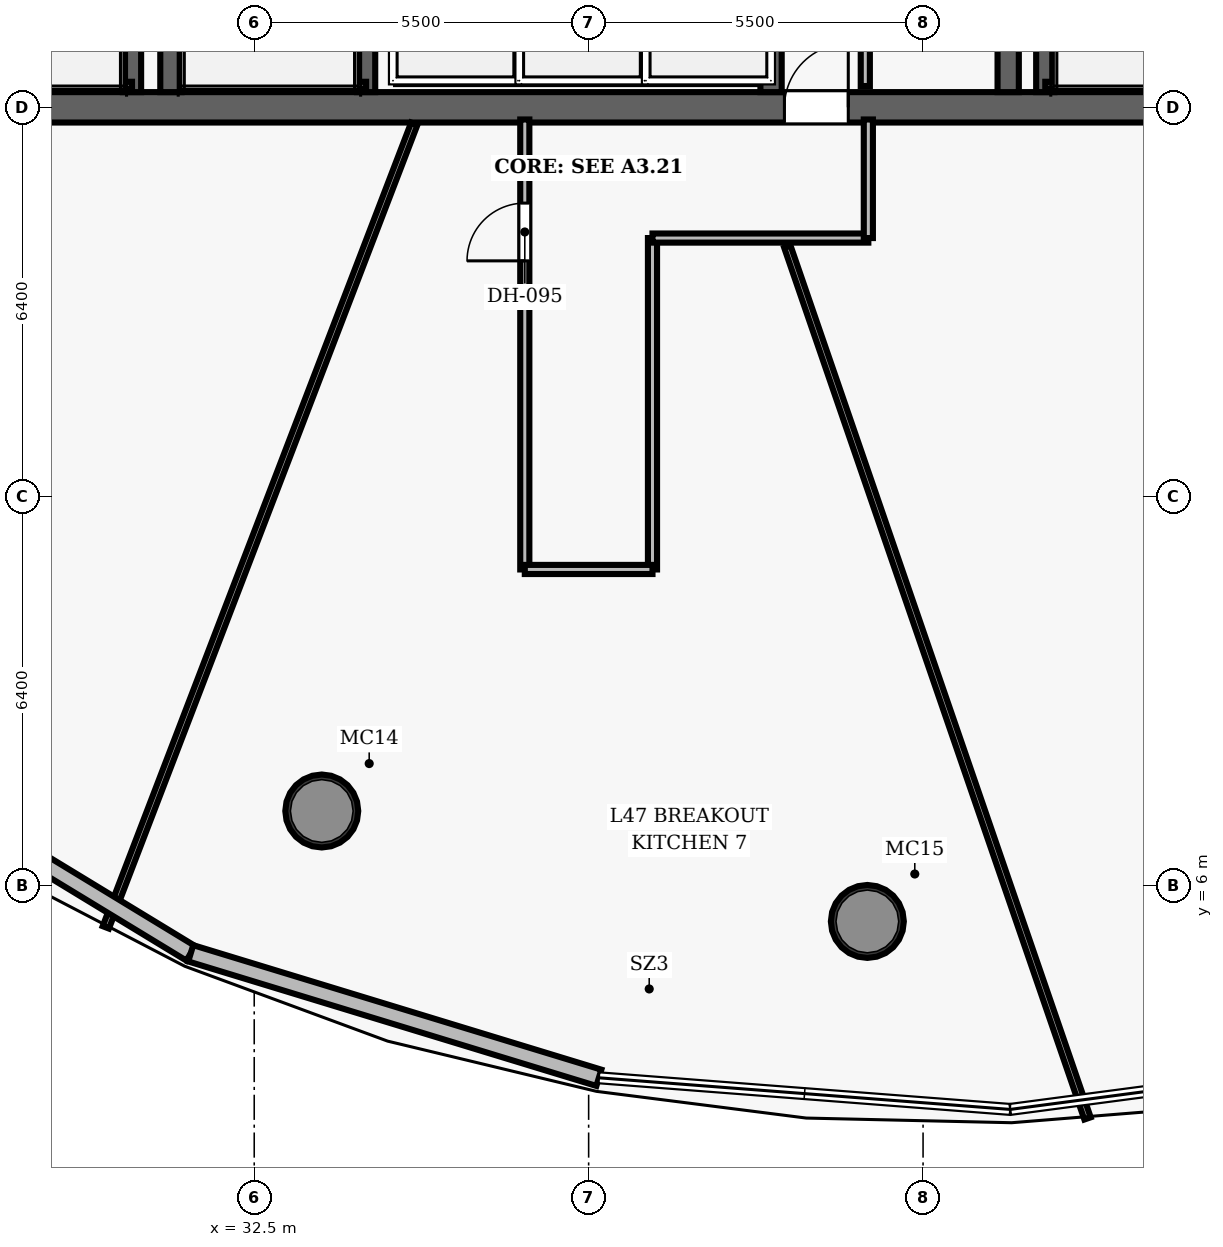
"""IFC4 building model, lengths in metres.
Left out: names, types, materials, properties, quantities, classifications, styles, units other than length and angle.
Written with IfcOpenShell. Run it as: python <this file> out.ifc"""

import sys

from ifc_helpers import new_model, si_unit, direction, frame, frame_2d, origin, origin_2d, place, context, subcontext, project, spatial, rectangle, hollow_circle, extrude, element, fill, save


model = new_model("IFC4")
c1 = context("Model", 3, precision=1e-05, world=origin(), true_north=direction((0.0, 1.0)))
c2 = subcontext(c1, "Body", "Model", "MODEL_VIEW")
j1 = project(units=[si_unit("LENGTHUNIT", "METRE"), si_unit("PLANEANGLEUNIT", "RADIAN")], contexts=[c1])
p1 = place(None, origin())
s1 = spatial("IfcSite", under=j1, at=p1, CompositionType="ELEMENT")
p2 = place(p1, origin())
s2 = spatial("IfcBuilding", under=s1, at=p2, CompositionType="ELEMENT")
p3 = place(p2, frame((0.0, 0.0, 186.6)))
s3 = spatial("IfcBuildingStorey", under=s2, at=p3, CompositionType="ELEMENT", Elevation=186.6)
p4 = place(p3, frame((26.75, 18.8, 0.0), z_axis=(0.0, 0.0, 1.0), x_axis=(1.0, 0.0, 0.0)))
e1 = element("IfcWall", 1, at=p4, inside=s3, PredefinedType="SHEAR", context=c2, shape_type="SweptSolid", body=[
    extrude(rectangle(XDim=22.5, YDim=0.5, at=frame_2d((11.25, 0.0))), origin(), (0.0, 0.0, 1.0), 3.85),
])
p5 = place(p4, frame((14.47, 0.0, 0.0)))
e2 = element("IfcOpeningElement", 2, at=p5, cuts=e1, PredefinedType="OPENING", context=c2, shape_type="SweptSolid", body=[
    extrude(rectangle(XDim=1.05, YDim=2.15, at=frame_2d((0.525, 1.075))), frame((0.0, 0.26, 0.0), z_axis=(0.0, -1.0, 0.0), x_axis=(1.0, 0.0, 0.0)), (0.0, 0.0, 1.0), 0.52),
])
for number, where, z_axis, x_axis in (
    (3, (31.13, 19.05, 0.0), (0.0, 0.0, 1.0), (0.0, 1.0, 0.0)),
    (4, (44.9, 19.05, 0.0), (0.0, 0.0, 1.0), (0.0, 1.0, 0.0)),
):
    element("IfcWall", number, at=place(p3, frame(where, z_axis=z_axis, x_axis=x_axis)), inside=s3, PredefinedType="SHEAR", context=c2, shape_type="SweptSolid", body=[
        extrude(rectangle(XDim=13.9, YDim=0.35, at=frame_2d((6.95, 0.0))), origin(), (0.0, 0.0, 1.0), 3.85),
    ])
for number, where, z_axis, x_axis in (
    (5, (33.611, 7.228, 0.0), (0.0, 0.0, 1.0), (1.0, 0.0, 0.0)),
    (6, (42.584, 5.412, 0.0), (0.0, 0.0, 1.0), (1.0, 0.0, 0.0)),
):
    element("IfcColumn", number, at=place(p3, frame(where, z_axis=z_axis, x_axis=x_axis)), inside=s3, PredefinedType="COLUMN", context=c2, shape_type="SweptSolid", body=[
        extrude(hollow_circle(Radius=0.6, WallThickness=0.05, at=origin_2d()), origin(), (0.0, 0.0, 1.0), 3.85),
    ])
p6 = place(p3, frame((30.49, 19.05, 0.0), z_axis=(0.0, 0.0, 1.0), x_axis=(0.0, 1.0, 0.0)))
e7 = element("IfcWall", 7, at=p6, inside=s3, PredefinedType="SHEAR", context=c2, shape_type="SweptSolid", body=[
    extrude(rectangle(XDim=7.5, YDim=0.3, at=frame_2d((3.75, 0.0))), origin(), (0.0, 0.0, 1.0), 3.85),
])
p7 = place(p3, frame((27.395, 19.16, 0.0), z_axis=(0.0, 0.0, 1.0), x_axis=(1.0, 0.0, 0.0)))
e8 = element("IfcWall", 8, at=p7, inside=s3, PredefinedType="SHEAR", context=c2, shape_type="SweptSolid", body=[
    extrude(rectangle(XDim=3.095, YDim=0.12, at=frame_2d((1.547, 0.0))), origin(), (0.0, 0.0, 1.0), 3.85),
])
p8 = place(p3, frame((45.51, 19.05, 0.0), z_axis=(0.0, 0.0, 1.0), x_axis=(0.0, 1.0, 0.0)))
e9 = element("IfcWall", 9, at=p8, inside=s3, PredefinedType="SHEAR", context=c2, shape_type="SweptSolid", body=[
    extrude(rectangle(XDim=7.5, YDim=0.3, at=frame_2d((3.75, 0.0))), origin(), (0.0, 0.0, 1.0), 3.85),
])
p9 = place(p3, frame((45.51, 19.16, 0.0), z_axis=(0.0, 0.0, 1.0), x_axis=(1.0, 0.0, 0.0)))
e10 = element("IfcWall", 10, at=p9, inside=s3, PredefinedType="SHEAR", context=c2, shape_type="SweptSolid", body=[
    extrude(rectangle(XDim=3.095, YDim=0.12, at=frame_2d((1.547, 0.0))), origin(), (0.0, 0.0, 1.0), 3.85),
])
p10 = place(p3, frame((34.34, 19.05, 0.0), z_axis=(0.0, 0.0, 1.0), x_axis=(0.0, 1.0, 0.0)))
e11 = element("IfcWall", 11, at=p10, inside=s3, PredefinedType="SHEAR", context=c2, shape_type="SweptSolid", body=[
    extrude(rectangle(XDim=7.5, YDim=0.3, at=frame_2d((3.75, 0.0))), origin(), (0.0, 0.0, 1.0), 3.85),
])
p11 = place(p3, frame((31.3, 19.16, 0.0), z_axis=(0.0, 0.0, 1.0), x_axis=(1.0, 0.0, 0.0)))
e12 = element("IfcWall", 12, at=p11, inside=s3, PredefinedType="SHEAR", context=c2, shape_type="SweptSolid", body=[
    extrude(rectangle(XDim=3.04, YDim=0.12, at=frame_2d((1.52, 0.0))), origin(), (0.0, 0.0, 1.0), 3.85),
])
p12 = place(p3, frame((41.0, 19.05, 0.0), z_axis=(0.0, 0.0, 1.0), x_axis=(0.0, 1.0, 0.0)))
e13 = element("IfcWall", 13, at=p12, inside=s3, PredefinedType="SHEAR", context=c2, shape_type="SweptSolid", body=[
    extrude(rectangle(XDim=2.08, YDim=0.35, at=frame_2d((1.04, 0.0))), origin(), (0.0, 0.0, 1.0), 3.035),
])
p13 = place(p3, frame((42.55, 19.15, 0.0), z_axis=(0.0, 0.0, 1.0), x_axis=(0.0, 1.0, 0.0)))
e14 = element("IfcWall", 14, at=p13, inside=s3, PredefinedType="PARTITIONING", context=c2, shape_type="SweptSolid", body=[
    extrude(rectangle(XDim=2.75, YDim=0.15, at=frame_2d((1.375, 0.0))), origin(), (0.0, 0.0, 1.0), 3.035),
])
p14 = place(p13, frame((0.7, 0.0, 0.0)))
e15 = element("IfcOpeningElement", 15, at=p14, cuts=e14, PredefinedType="OPENING", context=c2, shape_type="SweptSolid", body=[
    extrude(rectangle(XDim=0.85, YDim=2.1, at=frame_2d((0.425, 1.05))), frame((0.0, 0.085, 0.0), z_axis=(0.0, -1.0, 0.0), x_axis=(1.0, 0.0, 0.0)), (0.0, 0.0, 1.0), 0.17),
])
p15 = place(p3, frame((36.95, 11.2, 0.0), z_axis=(0.0, 0.0, 1.0), x_axis=(0.0, 1.0, 0.0)))
e16 = element("IfcWall", 16, at=p15, inside=s3, PredefinedType="PARTITIONING", context=c2, shape_type="SweptSolid", body=[
    extrude(rectangle(XDim=7.4, YDim=0.15, at=frame_2d((3.7, 0.0))), origin(), (0.0, 0.0, 1.0), 3.035),
])
p16 = place(p15, frame((5.075, 0.0, 0.0)))
e17 = element("IfcOpeningElement", 17, at=p16, cuts=e16, PredefinedType="OPENING", context=c2, shape_type="SweptSolid", body=[
    extrude(rectangle(XDim=0.95, YDim=2.15, at=frame_2d((0.475, 1.075))), frame((0.0, 0.085, 0.0), z_axis=(0.0, -1.0, 0.0), x_axis=(1.0, 0.0, 0.0)), (0.0, 0.0, 1.0), 0.17),
])
p17 = place(p3, frame((39.05, 11.2, 0.0), z_axis=(0.0, 0.0, 1.0), x_axis=(0.0, 1.0, 0.0)))
e18 = element("IfcWall", 18, at=p17, inside=s3, PredefinedType="PARTITIONING", context=c2, shape_type="SweptSolid", body=[
    extrude(rectangle(XDim=5.45, YDim=0.15, at=frame_2d((2.725, 0.0))), origin(), (0.0, 0.0, 1.0), 3.035),
])
p18 = place(p3, frame((39.05, 16.65, 0.0), z_axis=(0.0, 0.0, 1.0), x_axis=(1.0, 0.0, 0.0)))
e19 = element("IfcWall", 19, at=p18, inside=s3, PredefinedType="PARTITIONING", context=c2, shape_type="SweptSolid", body=[
    extrude(rectangle(XDim=3.55, YDim=0.15, at=frame_2d((1.775, 0.0))), origin(), (0.0, 0.0, 1.0), 3.035),
])
p19 = place(p3, frame((42.6, 16.65, 0.0), z_axis=(0.0, 0.0, 1.0), x_axis=(0.0, 1.0, 0.0)))
e20 = element("IfcWall", 20, at=p19, inside=s3, PredefinedType="PARTITIONING", context=c2, shape_type="SweptSolid", body=[
    extrude(rectangle(XDim=1.95, YDim=0.15, at=frame_2d((0.975, 0.0))), origin(), (0.0, 0.0, 1.0), 3.035),
])
p20 = place(p3, frame((36.95, 11.2, 0.0), z_axis=(0.0, 0.0, 1.0), x_axis=(1.0, 0.0, 0.0)))
e21 = element("IfcWall", 21, at=p20, inside=s3, PredefinedType="PARTITIONING", context=c2, shape_type="SweptSolid", body=[
    extrude(rectangle(XDim=2.1, YDim=0.15, at=frame_2d((1.05, 0.0))), origin(), (0.0, 0.0, 1.0), 3.035),
])
p21 = place(p3, frame((35.133, 18.53, 0.0), z_axis=(0.0, 0.0, 1.0), x_axis=(-0.358378051457, -0.933576548674, 0.0)))
e22 = element("IfcWall", 22, at=p21, inside=s3, PredefinedType="PARTITIONING", context=c2, shape_type="SweptSolid", body=[
    extrude(rectangle(XDim=14.156, YDim=0.11, at=frame_2d((7.078, 0.0))), origin(), (0.0, 0.0, 1.0), 3.035),
])
p22 = place(p3, frame((41.268, 16.51, 0.0), z_axis=(0.0, 0.0, 1.0), x_axis=(0.325572874443, -0.945516950365, 0.0)))
e23 = element("IfcWall", 23, at=p22, inside=s3, PredefinedType="PARTITIONING", context=c2, shape_type="SweptSolid", body=[
    extrude(rectangle(XDim=15.164, YDim=0.11, at=frame_2d((7.582, 0.0))), origin(), (0.0, 0.0, 1.0), 3.035),
])
p23 = place(p3, frame((31.456, 4.887, 0.0), z_axis=(0.0, 0.0, 1.0), x_axis=(-0.854423309843, 0.519577527995, 0.0)))
e24 = element("IfcWall", 24, at=p23, inside=s3, PredefinedType="SOLIDWALL", context=c2, shape_type="SweptSolid", body=[
    extrude(rectangle(XDim=7.045, YDim=0.28, at=frame_2d((3.523, 0.0))), origin(), (0.0, 0.0, 1.0), 3.62),
])
p24 = place(p3, frame((38.168, 2.84, 0.0), z_axis=(0.0, 0.0, 1.0), x_axis=(-0.956506455403, 0.291711159837, 0.0)))
e25 = element("IfcWall", 25, at=p24, inside=s3, PredefinedType="SOLIDWALL", context=c2, shape_type="SweptSolid", body=[
    extrude(rectangle(XDim=7.018, YDim=0.28, at=frame_2d((3.509, 0.0))), origin(), (0.0, 0.0, 1.0), 3.62),
])
p25 = place(p5, origin())
e26 = element("IfcDoor", 26, at=p25, inside=s3, OperationType="SINGLE_SWING_RIGHT", PredefinedType="DOOR", context=c2, shape_type="SweptSolid", body=[
    extrude(rectangle(XDim=1.05, YDim=2.15, at=frame_2d((0.525, 1.075))), frame((0.0, 0.025, 0.0), z_axis=(0.0, -1.0, 0.0), x_axis=(1.0, 0.0, 0.0)), (0.0, 0.0, 1.0), 0.05),
])
fill(e2, e26)
p26 = place(p16, origin())
e27 = element("IfcDoor", 27, at=p26, inside=s3, OperationType="SINGLE_SWING_LEFT", PredefinedType="DOOR", context=c2, shape_type="SweptSolid", body=[
    extrude(rectangle(XDim=0.95, YDim=2.15, at=frame_2d((0.475, 1.075))), frame((0.0, 0.025, 0.0), z_axis=(0.0, -1.0, 0.0), x_axis=(1.0, 0.0, 0.0)), (0.0, 0.0, 1.0), 0.05),
])
fill(e17, e27)
save(model, sys.argv[1])
